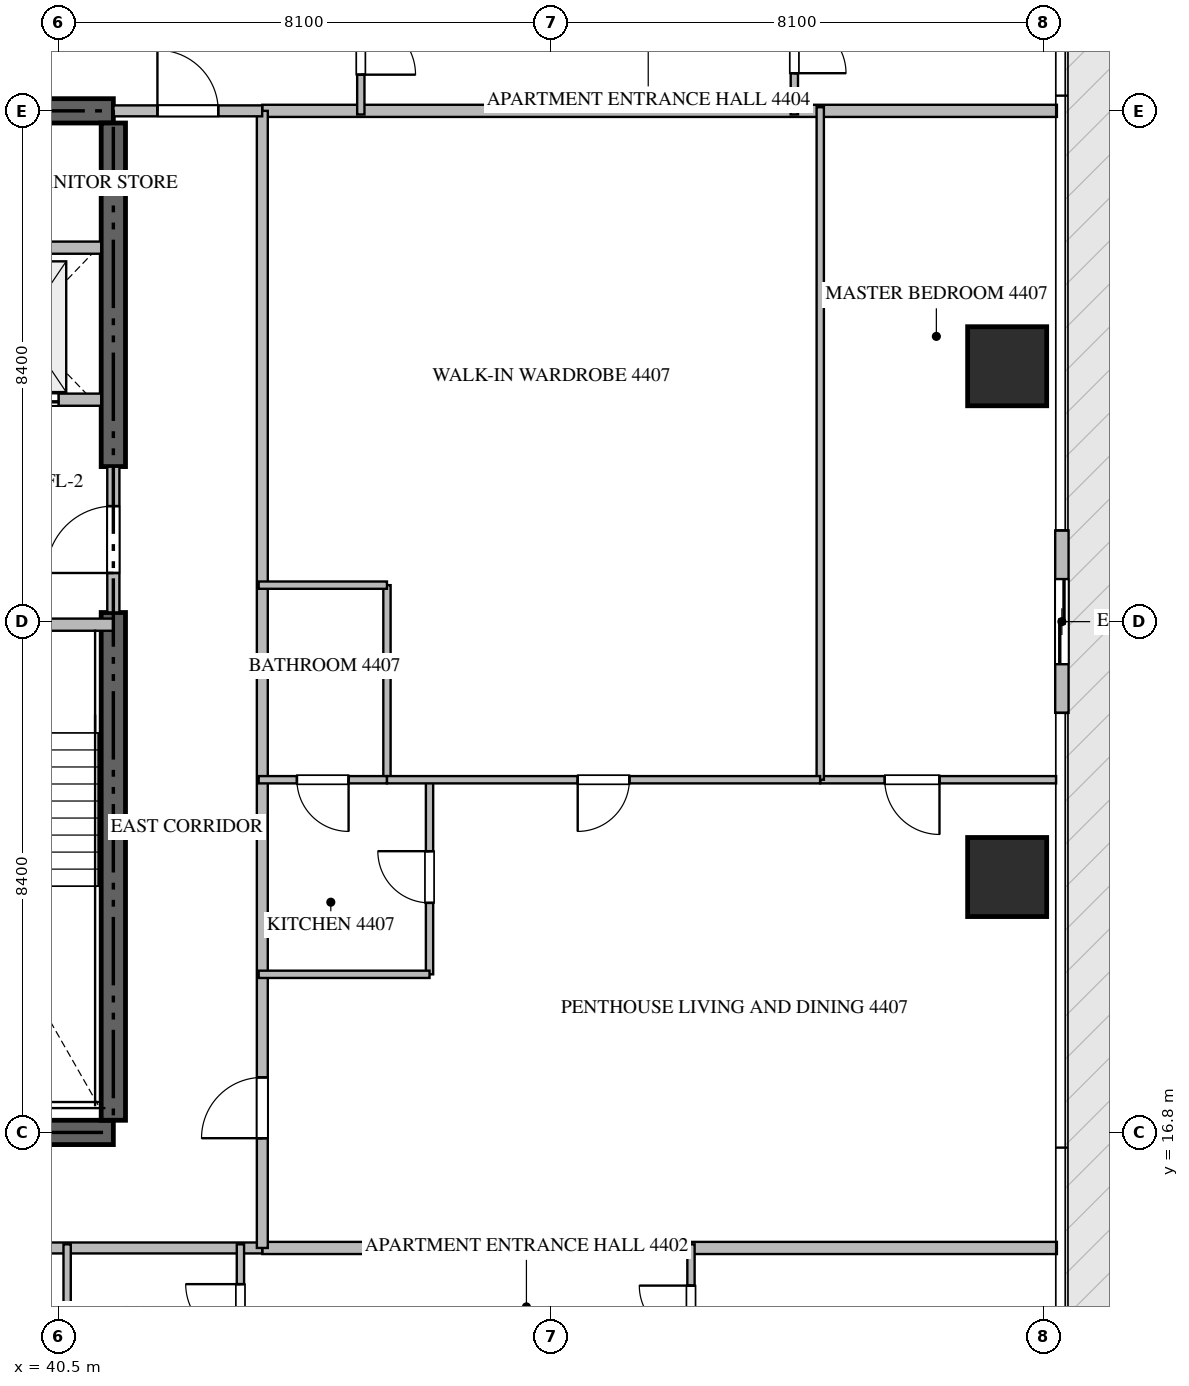
"""IFC4 building model, lengths in metres.
Left out: names, types, materials, properties, quantities, classifications, styles, units other than length and angle.
Written with IfcOpenShell. Run it as: python <this file> out.ifc"""

import sys

from ifc_helpers import new_model, si_unit, direction, frame, frame_2d, origin, origin_2d, place, context, subcontext, project, spatial, rectangle, extrude, source, transform, mapped, element, fill, save


model = new_model("IFC4")
c1 = context("Model", 3, precision=1e-05, world=origin(), true_north=direction((0.0, 1.0)))
c2 = subcontext(c1, "Body", "Model", "MODEL_VIEW")
j1 = project(units=[si_unit("LENGTHUNIT", "METRE"), si_unit("PLANEANGLEUNIT", "RADIAN")], contexts=[c1])
p1 = place(None, origin())
s1 = spatial("IfcSite", under=j1, at=p1, CompositionType="ELEMENT")
p2 = place(p1, origin())
s2 = spatial("IfcBuilding", under=s1, at=p2, CompositionType="ELEMENT")
p3 = place(p2, frame((0.0, 0.0, 176.4)))
s3 = spatial("IfcBuildingStorey", under=s2, at=p3, CompositionType="ELEMENT", Elevation=176.4)
for number, where, z_axis, x_axis in (
    (1, (23.4, 16.8, -0.26), (0.0, 0.0, 1.0), (1.0, 0.0, 0.0)),
    (2, (41.4, 33.6, -0.26), (0.0, 0.0, 1.0), (-1.0, 0.0, 0.0)),
):
    element("IfcWall", number, at=place(p3, frame(where, z_axis=z_axis, x_axis=x_axis)), inside=s3, PredefinedType="SHEAR", context=c2, shape_type="SweptSolid", body=[
        extrude(rectangle(XDim=18.0, YDim=0.4, at=frame_2d((9.0, 0.0))), origin(), (0.0, 0.0, 1.0), 3.748),
    ])
p4 = place(p3, frame((41.4, 17.0, -0.26), z_axis=(0.0, 0.0, 1.0), x_axis=(0.0, 1.0, 0.0)))
e3 = element("IfcWall", 3, at=p4, inside=s3, PredefinedType="SHEAR", context=c2, shape_type="SweptSolid", body=[
    extrude(rectangle(XDim=8.35, YDim=0.4, at=frame_2d((4.175, 0.0))), origin(), (0.0, 0.0, 1.0), 3.748),
])
p5 = place(p3, frame((41.4, 27.75, -0.26), z_axis=(0.0, 0.0, 1.0), x_axis=(0.0, 1.0, 0.0)))
e4 = element("IfcWall", 4, at=p5, inside=s3, PredefinedType="SHEAR", context=c2, shape_type="SweptSolid", body=[
    extrude(rectangle(XDim=5.65, YDim=0.4, at=frame_2d((2.825, 0.0))), origin(), (0.0, 0.0, 1.0), 3.748),
])
m1 = source(origin(), c2, "Body", "SweptSolid", [
    extrude(rectangle(XDim=1.3, YDim=1.3, at=origin_2d()), origin(), (0.0, 0.0, 1.0), 3.75),
])
for number, where, z_axis, x_axis in (
    (5, (56.1, 21.0, -0.26), (0.0, 0.0, 1.0), (1.0, 0.0, 0.0)),
    (6, (56.1, 29.4, -0.26), (0.0, 0.0, 1.0), (1.0, 0.0, 0.0)),
):
    element("IfcColumn", number, at=place(p3, frame(where, z_axis=z_axis, x_axis=x_axis)), inside=s3, PredefinedType="COLUMN", context=c2, shape_type="MappedRepresentation", body=[
        mapped(m1, transform((0.0, 0.0, 0.0), scale=1.0)),
    ])
p6 = place(p3, frame((57.0, 23.7, 0.0), z_axis=(0.0, 0.0, 1.0), x_axis=(0.0, 1.0, 0.0)))
e7 = element("IfcWall", 7, at=p6, inside=s3, PredefinedType="ELEMENTEDWALL", context=c2, shape_type="SweptSolid", body=[
    extrude(rectangle(XDim=3.0, YDim=0.22, at=frame_2d((1.5, 0.0))), origin(), (0.0, 0.0, 1.0), 3.475),
])
p7 = place(p6, frame((0.8, 0.0, 0.0)))
e8 = element("IfcOpeningElement", 8, at=p7, cuts=e7, PredefinedType="OPENING", context=c2, shape_type="SweptSolid", body=[
    extrude(rectangle(XDim=1.4, YDim=2.25, at=frame_2d((0.7, 1.125))), frame((0.0, 0.12, 0.0), z_axis=(0.0, -1.0, 0.0), x_axis=(1.0, 0.0, 0.0)), (0.0, 0.0, 1.0), 0.24),
])
p8 = place(p3, frame((36.95, 25.15, 0.0), z_axis=(0.0, 0.0, 1.0), x_axis=(1.0, 0.0, 0.0)))
e9 = element("IfcWall", 9, at=p8, inside=s3, PredefinedType="STANDARD", context=c2, shape_type="SweptSolid", body=[
    extrude(rectangle(XDim=4.45, YDim=0.2, at=frame_2d((2.225, 0.0))), origin(), (0.0, 0.0, 1.0), 3.49),
])
p9 = place(p8, frame((1.65, 0.0, 0.0)))
e10 = element("IfcOpeningElement", 10, at=p9, cuts=e9, PredefinedType="OPENING", context=c2, shape_type="SweptSolid", body=[
    extrude(rectangle(XDim=1.1, YDim=2.15, at=frame_2d((0.55, 1.075))), frame((0.0, 0.11, 0.0), z_axis=(0.0, -1.0, 0.0), x_axis=(1.0, 0.0, 0.0)), (0.0, 0.0, 1.0), 0.22),
])
p10 = place(p3, frame((38.75, 28.85, 0.0), z_axis=(0.0, 0.0, 1.0), x_axis=(1.0, 0.0, 0.0)))
e11 = element("IfcWall", 11, at=p10, inside=s3, PredefinedType="STANDARD", context=c2, shape_type="SweptSolid", body=[
    extrude(rectangle(XDim=2.45, YDim=0.2, at=frame_2d((1.225, 0.0))), origin(), (0.0, 0.0, 1.0), 3.49),
])
p11 = place(p10, frame((0.55, 0.0, 0.0)))
e12 = element("IfcOpeningElement", 12, at=p11, cuts=e11, PredefinedType="OPENING", context=c2, shape_type="SweptSolid", body=[
    extrude(rectangle(XDim=1.2, YDim=2.2, at=frame_2d((0.6, 1.1))), frame((0.0, 0.11, 0.0), z_axis=(0.0, -1.0, 0.0), x_axis=(1.0, 0.0, 0.0)), (0.0, 0.0, 1.0), 0.22),
])
p12 = place(p3, frame((38.75, 31.35, 0.0), z_axis=(0.0, 0.0, 1.0), x_axis=(1.0, 0.0, 0.0)))
e13 = element("IfcWall", 13, at=p12, inside=s3, PredefinedType="STANDARD", context=c2, shape_type="SweptSolid", body=[
    extrude(rectangle(XDim=2.45, YDim=0.2, at=frame_2d((1.225, 0.0))), origin(), (0.0, 0.0, 1.0), 3.49),
])
p13 = place(p3, frame((41.4, 25.352, 0.0), z_axis=(0.0, 0.0, 1.0), x_axis=(0.0, 1.0, 0.0)))
e14 = element("IfcWall", 14, at=p13, inside=s3, PredefinedType="STANDARD", context=c2, shape_type="SweptSolid", body=[
    extrude(rectangle(XDim=2.396, YDim=0.2, at=frame_2d((1.198, 0.0))), origin(), (0.0, 0.0, 1.0), 3.49),
])
p14 = place(p13, frame((0.648, 0.0, 0.0)))
e15 = element("IfcOpeningElement", 15, at=p14, cuts=e14, PredefinedType="OPENING", context=c2, shape_type="SweptSolid", body=[
    extrude(rectangle(XDim=1.1, YDim=2.15, at=frame_2d((0.55, 1.075))), frame((0.0, 0.11, 0.0), z_axis=(0.0, -1.0, 0.0), x_axis=(1.0, 0.0, 0.0)), (0.0, 0.0, 1.0), 0.22),
])
for number, where, z_axis, x_axis in (
    (16, (43.85, 14.9, 0.0), (0.0, 0.0, 1.0), (1.0, 0.0, 0.0)),
    (17, (43.85, 33.6, 0.0), (0.0, 0.0, 1.0), (1.0, 0.0, 0.0)),
):
    element("IfcWall", number, at=place(p3, frame(where, z_axis=z_axis, x_axis=x_axis)), inside=s3, PredefinedType="PARTITIONING", context=c2, shape_type="SweptSolid", body=[
        extrude(rectangle(XDim=13.068, YDim=0.2, at=frame_2d((6.534, 0.0))), origin(), (0.0, 0.0, 1.0), 3.49),
    ])
p15 = place(p3, frame((20.952, 14.9, 0.0), z_axis=(0.0, 0.0, 1.0), x_axis=(1.0, 0.0, 0.0)))
e18 = element("IfcWall", 18, at=p15, inside=s3, PredefinedType="PARTITIONING", context=c2, shape_type="SweptSolid", body=[
    extrude(rectangle(XDim=22.896, YDim=0.18, at=frame_2d((11.448, 0.0))), origin(), (0.0, 0.0, 1.0), 3.49),
])
p16 = place(p15, frame((5.934, 0.0, 0.0)))
e19 = element("IfcOpeningElement", 19, at=p16, cuts=e18, PredefinedType="OPENING", context=c2, shape_type="SweptSolid", body=[
    extrude(rectangle(XDim=1.0, YDim=2.15, at=frame_2d((0.5, 1.075))), frame((0.0, 0.1, 0.0), z_axis=(0.0, -1.0, 0.0), x_axis=(1.0, 0.0, 0.0)), (0.0, 0.0, 1.0), 0.2),
])
p17 = place(p15, frame((16.51, 0.0, 0.0)))
e20 = element("IfcOpeningElement", 20, at=p17, cuts=e18, PredefinedType="OPENING", context=c2, shape_type="SweptSolid", body=[
    extrude(rectangle(XDim=1.0, YDim=2.15, at=frame_2d((0.5, 1.075))), frame((0.0, 0.1, 0.0), z_axis=(0.0, -1.0, 0.0), x_axis=(1.0, 0.0, 0.0)), (0.0, 0.0, 1.0), 0.2),
])
p18 = place(p3, frame((43.85, 14.9, 0.0), z_axis=(0.0, 0.0, 1.0), x_axis=(0.0, 1.0, 0.0)))
e21 = element("IfcWall", 21, at=p18, inside=s3, PredefinedType="PARTITIONING", context=c2, shape_type="SweptSolid", body=[
    extrude(rectangle(XDim=18.7, YDim=0.18, at=frame_2d((9.35, 0.0))), origin(), (0.0, 0.0, 1.0), 3.49),
])
p19 = place(p18, frame((1.805, 0.0, 0.0)))
e22 = element("IfcOpeningElement", 22, at=p19, cuts=e21, PredefinedType="OPENING", context=c2, shape_type="SweptSolid", body=[
    extrude(rectangle(XDim=1.0, YDim=2.15, at=frame_2d((0.5, 1.075))), frame((0.0, 0.1, 0.0), z_axis=(0.0, -1.0, 0.0), x_axis=(1.0, 0.0, 0.0)), (0.0, 0.0, 1.0), 0.2),
])
p20 = place(p3, frame((41.402, 33.6, 0.0), z_axis=(0.0, 0.0, 1.0), x_axis=(1.0, 0.0, 0.0)))
e23 = element("IfcWall", 23, at=p20, inside=s3, PredefinedType="PARTITIONING", context=c2, shape_type="SweptSolid", body=[
    extrude(rectangle(XDim=2.446, YDim=0.18, at=frame_2d((1.223, 0.0))), origin(), (0.0, 0.0, 1.0), 3.49),
])
p21 = place(p20, frame((0.723, 0.0, 0.0)))
e24 = element("IfcOpeningElement", 24, at=p21, cuts=e23, PredefinedType="OPENING", context=c2, shape_type="SweptSolid", body=[
    extrude(rectangle(XDim=1.0, YDim=2.15, at=frame_2d((0.5, 1.075))), frame((0.0, 0.1, 0.0), z_axis=(0.0, -1.0, 0.0), x_axis=(1.0, 0.0, 0.0)), (0.0, 0.0, 1.0), 0.2),
])
p22 = place(p3, frame((40.64, 12.15, 0.0), z_axis=(0.0, 0.0, 1.0), x_axis=(0.0, 1.0, 0.0)))
e25 = element("IfcWall", 25, at=p22, inside=s3, PredefinedType="PARTITIONING", context=c2, shape_type="SweptSolid", body=[
    extrude(rectangle(XDim=2.81, YDim=0.12, at=frame_2d((1.405, 0.0))), origin(), (0.0, 0.0, 1.0), 3.49),
])
p23 = place(p3, frame((43.49, 12.75, 0.0), z_axis=(0.0, 0.0, 1.0), x_axis=(0.0, 1.0, 0.0)))
e26 = element("IfcWall", 26, at=p23, inside=s3, PredefinedType="PARTITIONING", context=c2, shape_type="SweptSolid", body=[
    extrude(rectangle(XDim=2.21, YDim=0.12, at=frame_2d((1.105, 0.0))), origin(), (0.0, 0.0, 1.0), 3.49),
])
p24 = place(p23, frame((0.655, 0.0, 0.0)))
e27 = element("IfcOpeningElement", 27, at=p24, cuts=e26, PredefinedType="OPENING", context=c2, shape_type="SweptSolid", body=[
    extrude(rectangle(XDim=0.9, YDim=2.1, at=frame_2d((0.45, 1.05))), frame((0.0, 0.07, 0.0), z_axis=(0.0, -1.0, 0.0), x_axis=(1.0, 0.0, 0.0)), (0.0, 0.0, 1.0), 0.14),
])
p25 = place(p3, frame((50.9, 12.752, 0.0), z_axis=(0.0, 0.0, 1.0), x_axis=(0.0, 1.0, 0.0)))
e28 = element("IfcWall", 28, at=p25, inside=s3, PredefinedType="PARTITIONING", context=c2, shape_type="SweptSolid", body=[
    extrude(rectangle(XDim=2.208, YDim=0.12, at=frame_2d((1.104, 0.0))), origin(), (0.0, 0.0, 1.0), 3.49),
])
p26 = place(p25, frame((0.679, 0.0, 0.0)))
e29 = element("IfcOpeningElement", 29, at=p26, cuts=e28, PredefinedType="OPENING", context=c2, shape_type="SweptSolid", body=[
    extrude(rectangle(XDim=0.85, YDim=2.1, at=frame_2d((0.425, 1.05))), frame((0.0, 0.07, 0.0), z_axis=(0.0, -1.0, 0.0), x_axis=(1.0, 0.0, 0.0)), (0.0, 0.0, 1.0), 0.14),
])
p27 = place(p3, frame((45.47, 35.75, 0.0), z_axis=(0.0, 0.0, 1.0), x_axis=(0.0, -1.0, 0.0)))
e30 = element("IfcWall", 30, at=p27, inside=s3, PredefinedType="PARTITIONING", context=c2, shape_type="SweptSolid", body=[
    extrude(rectangle(XDim=2.21, YDim=0.12, at=frame_2d((1.105, 0.0))), origin(), (0.0, 0.0, 1.0), 3.49),
])
p28 = place(p27, frame((0.655, 0.0, 0.0)))
e31 = element("IfcOpeningElement", 31, at=p28, cuts=e30, PredefinedType="OPENING", context=c2, shape_type="SweptSolid", body=[
    extrude(rectangle(XDim=0.9, YDim=2.1, at=frame_2d((0.45, 1.05))), frame((0.0, 0.07, 0.0), z_axis=(0.0, -1.0, 0.0), x_axis=(1.0, 0.0, 0.0)), (0.0, 0.0, 1.0), 0.14),
])
p29 = place(p3, frame((52.6, 35.748, 0.0), z_axis=(0.0, 0.0, 1.0), x_axis=(0.0, -1.0, 0.0)))
e32 = element("IfcWall", 32, at=p29, inside=s3, PredefinedType="PARTITIONING", context=c2, shape_type="SweptSolid", body=[
    extrude(rectangle(XDim=2.208, YDim=0.12, at=frame_2d((1.104, 0.0))), origin(), (0.0, 0.0, 1.0), 3.49),
])
p30 = place(p29, frame((0.679, 0.0, 0.0)))
e33 = element("IfcOpeningElement", 33, at=p30, cuts=e32, PredefinedType="OPENING", context=c2, shape_type="SweptSolid", body=[
    extrude(rectangle(XDim=0.85, YDim=2.1, at=frame_2d((0.425, 1.05))), frame((0.0, 0.07, 0.0), z_axis=(0.0, -1.0, 0.0), x_axis=(1.0, 0.0, 0.0)), (0.0, 0.0, 1.0), 0.14),
])
p31 = place(p3, frame((46.6, 19.4, 0.0), z_axis=(0.0, 0.0, 1.0), x_axis=(0.0, 1.0, 0.0)))
e34 = element("IfcWall", 34, at=p31, inside=s3, PredefinedType="PARTITIONING", context=c2, shape_type="SweptSolid", body=[
    extrude(rectangle(XDim=3.2, YDim=0.12, at=frame_2d((1.6, 0.0))), origin(), (0.0, 0.0, 1.0), 3.49),
])
p32 = place(p31, frame((1.175, 0.0, 0.0)))
e35 = element("IfcOpeningElement", 35, at=p32, cuts=e34, PredefinedType="OPENING", context=c2, shape_type="SweptSolid", body=[
    extrude(rectangle(XDim=0.85, YDim=2.1, at=frame_2d((0.425, 1.05))), frame((0.0, 0.07, 0.0), z_axis=(0.0, -1.0, 0.0), x_axis=(1.0, 0.0, 0.0)), (0.0, 0.0, 1.0), 0.14),
])
p33 = place(p3, frame((46.6, 19.4, 0.0), z_axis=(0.0, 0.0, 1.0), x_axis=(-1.0, 0.0, 0.0)))
e36 = element("IfcWall", 36, at=p33, inside=s3, PredefinedType="PARTITIONING", context=c2, shape_type="SweptSolid", body=[
    extrude(rectangle(XDim=2.81, YDim=0.12, at=frame_2d((1.405, 0.0))), origin(), (0.0, 0.0, 1.0), 3.49),
])
p34 = place(p3, frame((56.905, 22.6, 0.0), z_axis=(0.0, 0.0, 1.0), x_axis=(-1.0, 0.0, 0.0)))
e37 = element("IfcWall", 37, at=p34, inside=s3, PredefinedType="PARTITIONING", context=c2, shape_type="SweptSolid", body=[
    extrude(rectangle(XDim=3.879, YDim=0.12, at=frame_2d((1.939, 0.0))), origin(), (0.0, 0.0, 1.0), 3.49),
])
p35 = place(p34, frame((1.918, 0.0, 0.0)))
e38 = element("IfcOpeningElement", 38, at=p35, cuts=e37, PredefinedType="OPENING", context=c2, shape_type="SweptSolid", body=[
    extrude(rectangle(XDim=0.9, YDim=2.1, at=frame_2d((0.45, 1.05))), frame((0.0, 0.07, 0.0), z_axis=(0.0, -1.0, 0.0), x_axis=(1.0, 0.0, 0.0)), (0.0, 0.0, 1.0), 0.14),
])
p36 = place(p3, frame((53.026, 22.6, 0.0), z_axis=(0.0, 0.0, 1.0), x_axis=(0.0, 1.0, 0.0)))
e39 = element("IfcWall", 39, at=p36, inside=s3, PredefinedType="PARTITIONING", context=c2, shape_type="SweptSolid", body=[
    extrude(rectangle(XDim=11.06, YDim=0.12, at=frame_2d((5.53, 0.0))), origin(), (0.0, 0.0, 1.0), 3.49),
])
p37 = place(p3, frame((45.9, 22.6, 0.0), z_axis=(0.0, 0.0, 1.0), x_axis=(0.0, 1.0, 0.0)))
e40 = element("IfcWall", 40, at=p37, inside=s3, PredefinedType="PARTITIONING", context=c2, shape_type="SweptSolid", body=[
    extrude(rectangle(XDim=3.2, YDim=0.12, at=frame_2d((1.6, 0.0))), origin(), (0.0, 0.0, 1.0), 3.49),
])
p38 = place(p3, frame((45.9, 25.8, 0.0), z_axis=(0.0, 0.0, 1.0), x_axis=(-1.0, 0.0, 0.0)))
e41 = element("IfcWall", 41, at=p38, inside=s3, PredefinedType="PARTITIONING", context=c2, shape_type="SweptSolid", body=[
    extrude(rectangle(XDim=2.11, YDim=0.12, at=frame_2d((1.055, 0.0))), origin(), (0.0, 0.0, 1.0), 3.49),
])
p39 = place(p3, frame((53.024, 22.6, 0.0), z_axis=(0.0, 0.0, 1.0), x_axis=(-1.0, 0.0, 0.0)))
e42 = element("IfcWall", 42, at=p39, inside=s3, PredefinedType="PARTITIONING", context=c2, shape_type="SweptSolid", body=[
    extrude(rectangle(XDim=7.124, YDim=0.12, at=frame_2d((3.562, 0.0))), origin(), (0.0, 0.0, 1.0), 3.49),
])
p40 = place(p39, frame((3.137, 0.0, 0.0)))
e43 = element("IfcOpeningElement", 43, at=p40, cuts=e42, PredefinedType="OPENING", context=c2, shape_type="SweptSolid", body=[
    extrude(rectangle(XDim=0.85, YDim=2.1, at=frame_2d((0.425, 1.05))), frame((0.0, 0.07, 0.0), z_axis=(0.0, -1.0, 0.0), x_axis=(1.0, 0.0, 0.0)), (0.0, 0.0, 1.0), 0.14),
])
p41 = place(p3, frame((45.898, 22.6, 0.0), z_axis=(0.0, 0.0, 1.0), x_axis=(-1.0, 0.0, 0.0)))
e44 = element("IfcWall", 44, at=p41, inside=s3, PredefinedType="PARTITIONING", context=c2, shape_type="SweptSolid", body=[
    extrude(rectangle(XDim=2.108, YDim=0.12, at=frame_2d((1.054, 0.0))), origin(), (0.0, 0.0, 1.0), 3.49),
])
p42 = place(p41, frame((0.629, 0.0, 0.0)))
e45 = element("IfcOpeningElement", 45, at=p42, cuts=e44, PredefinedType="OPENING", context=c2, shape_type="SweptSolid", body=[
    extrude(rectangle(XDim=0.85, YDim=2.1, at=frame_2d((0.425, 1.05))), frame((0.0, 0.07, 0.0), z_axis=(0.0, -1.0, 0.0), x_axis=(1.0, 0.0, 0.0)), (0.0, 0.0, 1.0), 0.14),
])
m2 = source(origin(), c2, "Body", "SweptSolid", [
    extrude(rectangle(XDim=1.4, YDim=2.25, at=frame_2d((0.7, 1.125))), frame((0.0, 0.025, 0.0), z_axis=(0.0, -1.0, 0.0), x_axis=(1.0, 0.0, 0.0)), (0.0, 0.0, 1.0), 0.05),
])
p43 = place(p7, origin())
e46 = element("IfcDoor", 46, at=p43, inside=s3, OperationType="SLIDING_TO_LEFT", PredefinedType="DOOR", context=c2, shape_type="MappedRepresentation", body=[
    mapped(m2, transform((0.0, 0.0, 0.0), scale=1.0)),
])
fill(e8, e46)
m3 = source(origin(), c2, "Body", "SweptSolid", [
    extrude(rectangle(XDim=1.2, YDim=2.2, at=frame_2d((0.6, 1.1))), frame((0.0, 0.025, 0.0), z_axis=(0.0, -1.0, 0.0), x_axis=(1.0, 0.0, 0.0)), (0.0, 0.0, 1.0), 0.05),
])
p44 = place(p11, origin())
e47 = element("IfcDoor", 47, at=p44, inside=s3, OperationType="DOUBLE_DOOR_SLIDING", PredefinedType="DOOR", context=c2, shape_type="MappedRepresentation", body=[
    mapped(m3, transform((0.0, 0.0, 0.0), scale=1.0)),
])
fill(e12, e47)
m4 = source(origin(), c2, "Body", "SweptSolid", [
    extrude(rectangle(XDim=1.1, YDim=2.15, at=frame_2d((0.55, 1.075))), frame((0.0, 0.025, 0.0), z_axis=(0.0, -1.0, 0.0), x_axis=(1.0, 0.0, 0.0)), (0.0, 0.0, 1.0), 0.05),
])
p45 = place(p14, origin())
e48 = element("IfcDoor", 48, at=p45, inside=s3, OperationType="SINGLE_SWING_LEFT", PredefinedType="DOOR", context=c2, shape_type="MappedRepresentation", body=[
    mapped(m4, transform((0.0, 0.0, 0.0), scale=1.0)),
])
fill(e15, e48)
m5 = source(origin(), c2, "Body", "SweptSolid", [
    extrude(rectangle(XDim=1.0, YDim=2.15, at=frame_2d((0.5, 1.075))), frame((0.0, 0.025, 0.0), z_axis=(0.0, -1.0, 0.0), x_axis=(1.0, 0.0, 0.0)), (0.0, 0.0, 1.0), 0.05),
])
p46 = place(p19, origin())
e49 = element("IfcDoor", 49, at=p46, inside=s3, OperationType="SINGLE_SWING_LEFT", PredefinedType="DOOR", context=c2, shape_type="MappedRepresentation", body=[
    mapped(m5, transform((0.0, 0.0, 0.0), scale=1.0)),
])
fill(e22, e49)
p47 = place(p21, origin())
e50 = element("IfcDoor", 50, at=p47, inside=s3, OperationType="SINGLE_SWING_LEFT", PredefinedType="DOOR", context=c2, shape_type="MappedRepresentation", body=[
    mapped(m5, transform((0.0, 0.0, 0.0), scale=1.0)),
])
fill(e24, e50)
m6 = source(origin(), c2, "Body", "SweptSolid", [
    extrude(rectangle(XDim=0.9, YDim=2.1, at=frame_2d((0.45, 1.05))), frame((0.0, 0.025, 0.0), z_axis=(0.0, -1.0, 0.0), x_axis=(1.0, 0.0, 0.0)), (0.0, 0.0, 1.0), 0.05),
])
p48 = place(p24, origin())
e51 = element("IfcDoor", 51, at=p48, inside=s3, OperationType="SINGLE_SWING_RIGHT", PredefinedType="DOOR", context=c2, shape_type="MappedRepresentation", body=[
    mapped(m6, transform((0.0, 0.0, 0.0), scale=1.0)),
])
fill(e27, e51)
m7 = source(origin(), c2, "Body", "SweptSolid", [
    extrude(rectangle(XDim=0.85, YDim=2.1, at=frame_2d((0.425, 1.05))), frame((0.0, 0.025, 0.0), z_axis=(0.0, -1.0, 0.0), x_axis=(1.0, 0.0, 0.0)), (0.0, 0.0, 1.0), 0.05),
])
p49 = place(p26, origin())
e52 = element("IfcDoor", 52, at=p49, inside=s3, OperationType="SINGLE_SWING_RIGHT", PredefinedType="DOOR", context=c2, shape_type="MappedRepresentation", body=[
    mapped(m7, transform((0.0, 0.0, 0.0), scale=1.0)),
])
fill(e29, e52)
p50 = place(p28, origin())
e53 = element("IfcDoor", 53, at=p50, inside=s3, OperationType="SINGLE_SWING_RIGHT", PredefinedType="DOOR", context=c2, shape_type="MappedRepresentation", body=[
    mapped(m6, transform((0.0, 0.0, 0.0), scale=1.0)),
])
fill(e31, e53)
p51 = place(p30, origin())
e54 = element("IfcDoor", 54, at=p51, inside=s3, OperationType="SINGLE_SWING_RIGHT", PredefinedType="DOOR", context=c2, shape_type="MappedRepresentation", body=[
    mapped(m7, transform((0.0, 0.0, 0.0), scale=1.0)),
])
fill(e33, e54)
p52 = place(p32, origin())
e55 = element("IfcDoor", 55, at=p52, inside=s3, OperationType="SINGLE_SWING_RIGHT", PredefinedType="DOOR", context=c2, shape_type="MappedRepresentation", body=[
    mapped(m7, transform((0.0, 0.0, 0.0), scale=1.0)),
])
fill(e35, e55)
p53 = place(p35, origin())
e56 = element("IfcDoor", 56, at=p53, inside=s3, OperationType="SINGLE_SWING_LEFT", PredefinedType="DOOR", context=c2, shape_type="MappedRepresentation", body=[
    mapped(m6, transform((0.0, 0.0, 0.0), scale=1.0)),
])
fill(e38, e56)
p54 = place(p40, origin())
e57 = element("IfcDoor", 57, at=p54, inside=s3, OperationType="SINGLE_SWING_RIGHT", PredefinedType="DOOR", context=c2, shape_type="MappedRepresentation", body=[
    mapped(m7, transform((0.0, 0.0, 0.0), scale=1.0)),
])
fill(e43, e57)
p55 = place(p42, origin())
e58 = element("IfcDoor", 58, at=p55, inside=s3, OperationType="SINGLE_SWING_LEFT", PredefinedType="DOOR", context=c2, shape_type="MappedRepresentation", body=[
    mapped(m7, transform((0.0, 0.0, 0.0), scale=1.0)),
])
fill(e45, e58)
save(model, sys.argv[1])
